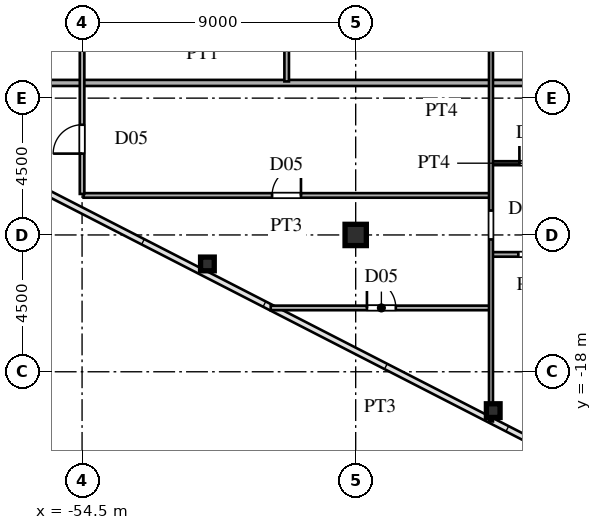
"""IFC4 building model, lengths in metres.
Left out: names, types, materials, properties, quantities, classifications, styles, units other than length and angle.
Written with IfcOpenShell. Run it as: python <this file> out.ifc"""

import sys

from ifc_helpers import new_model, si_unit, direction, frame, frame_2d, origin, origin_2d, place, context, subcontext, project, spatial, rectangle, hollow_rectangle, i_section, extrude, source, transform, mapped, element, fill, save


model = new_model("IFC4")
c1 = context("Model", 3, precision=1e-05, world=origin(), true_north=direction((0.0, 1.0)))
c2 = subcontext(c1, "Body", "Model", "MODEL_VIEW")
j1 = project(units=[si_unit("LENGTHUNIT", "METRE"), si_unit("PLANEANGLEUNIT", "RADIAN")], contexts=[c1])
p1 = place(None, origin())
s1 = spatial("IfcSite", under=j1, at=p1, CompositionType="ELEMENT")
p2 = place(p1, origin())
s2 = spatial("IfcBuilding", under=s1, at=p2, CompositionType="ELEMENT")
p3 = place(p2, frame((0.0, 0.0, 110.4)))
s3 = spatial("IfcBuildingStorey", under=s2, at=p3, CompositionType="ELEMENT", Elevation=110.4)
m1 = source(origin(), c2, "Body", "SweptSolid", [
    extrude(i_section(OverallWidth=0.7, OverallDepth=0.7, WebThickness=0.028, FlangeThickness=0.045, at=origin_2d()), origin(), (0.0, 0.0, 1.0), 3.6),
])
p4 = place(p3, frame((-45.5, -13.5, 0.0), z_axis=(0.0, 0.0, 1.0), x_axis=(1.0, 0.0, 0.0)))
e1 = element("IfcColumn", 1, at=p4, inside=s3, PredefinedType="COLUMN", context=c2, shape_type="MappedRepresentation", body=[
    mapped(m1, transform((0.0, 0.0, 0.0), scale=1.0)),
])
m2 = source(origin(), c2, "Body", "SweptSolid", [
    extrude(hollow_rectangle(XDim=0.45, YDim=0.45, WallThickness=0.018, at=origin_2d()), origin(), (0.0, 0.0, 1.0), 3.6),
])
for number, where, z_axis, x_axis in (
    (2, (-40.976, -19.278, 0.0), (0.0, 0.0, 1.0), (1.0, 0.0, 0.0)),
    (3, (-50.377, -14.453, 0.0), (0.0, 0.0, 1.0), (1.0, 0.0, 0.0)),
):
    element("IfcColumn", number, at=place(p3, frame(where, z_axis=z_axis, x_axis=x_axis)), inside=s3, PredefinedType="COLUMN", context=c2, shape_type="MappedRepresentation", body=[
        mapped(m2, transform((0.0, 0.0, 0.0), scale=1.0)),
    ])
p5 = place(p3, frame((-48.295, -15.9, 0.0), z_axis=(0.0, 0.0, 1.0), x_axis=(1.0, 0.0, 0.0)))
e4 = element("IfcWall", 4, at=p5, inside=s3, PredefinedType="PARTITIONING", context=c2, shape_type="SweptSolid", body=[
    extrude(rectangle(XDim=7.195, YDim=0.15, at=frame_2d((3.597, 0.0))), origin(), (0.0, 0.0, 1.0), 3.38),
])
p6 = place(p5, frame((3.165, 0.0, 0.0)))
e5 = element("IfcOpeningElement", 5, at=p6, cuts=e4, PredefinedType="OPENING", context=c2, shape_type="SweptSolid", body=[
    extrude(rectangle(XDim=0.95, YDim=2.15, at=frame_2d((0.475, 1.075))), frame((0.0, 0.085, 0.0), z_axis=(0.0, -1.0, 0.0), x_axis=(1.0, 0.0, 0.0)), (0.0, 0.0, 1.0), 0.17),
])
p7 = place(p3, frame((-41.0, -14.14, 0.0), z_axis=(0.0, 0.0, 1.0), x_axis=(1.0, 0.0, 0.0)))
e6 = element("IfcWall", 6, at=p7, inside=s3, PredefinedType="PARTITIONING", context=c2, shape_type="SweptSolid", body=[
    extrude(rectangle(XDim=2.65, YDim=0.15, at=frame_2d((1.325, 0.0))), origin(), (0.0, 0.0, 1.0), 3.38),
])
p8 = place(p7, frame((0.85, 0.0, 0.0)))
e7 = element("IfcOpeningElement", 7, at=p8, cuts=e6, PredefinedType="OPENING", context=c2, shape_type="SweptSolid", body=[
    extrude(rectangle(XDim=0.95, YDim=2.15, at=frame_2d((0.475, 1.075))), frame((0.0, 0.085, 0.0), z_axis=(0.0, -1.0, 0.0), x_axis=(1.0, 0.0, 0.0)), (0.0, 0.0, 1.0), 0.17),
])
p9 = place(p3, frame((-54.45, -12.2, 0.0), z_axis=(0.0, 0.0, 1.0), x_axis=(1.0, 0.0, 0.0)))
e8 = element("IfcWall", 8, at=p9, inside=s3, PredefinedType="PARTITIONING", context=c2, shape_type="SweptSolid", body=[
    extrude(rectangle(XDim=13.35, YDim=0.15, at=frame_2d((6.675, 0.0))), origin(), (0.0, 0.0, 1.0), 3.38),
])
p10 = place(p9, frame((6.2, 0.0, 0.0)))
e9 = element("IfcOpeningElement", 9, at=p10, cuts=e8, PredefinedType="OPENING", context=c2, shape_type="SweptSolid", body=[
    extrude(rectangle(XDim=0.95, YDim=2.15, at=frame_2d((0.475, 1.075))), frame((0.0, 0.085, 0.0), z_axis=(0.0, -1.0, 0.0), x_axis=(1.0, 0.0, 0.0)), (0.0, 0.0, 1.0), 0.17),
])
p11 = place(p3, frame((-41.0, -11.14, 0.0), z_axis=(0.0, 0.0, 1.0), x_axis=(1.0, 0.0, 0.0)))
e10 = element("IfcWall", 10, at=p11, inside=s3, PredefinedType="PARTITIONING", context=c2, shape_type="SweptSolid", body=[
    extrude(rectangle(XDim=2.65, YDim=0.13, at=frame_2d((1.325, 0.0))), origin(), (0.0, 0.0, 1.0), 3.38),
])
p12 = place(p11, frame((0.885, 0.0, 0.0)))
e11 = element("IfcOpeningElement", 11, at=p12, cuts=e10, PredefinedType="OPENING", context=c2, shape_type="SweptSolid", body=[
    extrude(rectangle(XDim=0.88, YDim=2.1, at=frame_2d((0.44, 1.05))), frame((0.0, 0.075, 0.0), z_axis=(0.0, -1.0, 0.0), x_axis=(1.0, 0.0, 0.0)), (0.0, 0.0, 1.0), 0.15),
])
p13 = place(p3, frame((-62.69, -8.5, 0.0), z_axis=(0.0, 0.0, 1.0), x_axis=(1.0, 0.0, 0.0)))
e12 = element("IfcWall", 12, at=p13, inside=s3, PredefinedType="PARTITIONING", context=c2, shape_type="SweptSolid", body=[
    extrude(rectangle(XDim=24.31, YDim=0.2, at=frame_2d((12.155, 0.0))), origin(), (0.0, 0.0, 1.0), 3.38),
])
p14 = place(p3, frame((-54.5, -12.15, 0.0), z_axis=(0.0, 0.0, 1.0), x_axis=(0.0, 1.0, 0.0)))
e13 = element("IfcWall", 13, at=p14, inside=s3, PredefinedType="PARTITIONING", context=c2, shape_type="SweptSolid", body=[
    extrude(rectangle(XDim=22.3, YDim=0.15, at=frame_2d((11.15, 0.0))), origin(), (0.0, 0.0, 1.0), 2.78),
])
p15 = place(p14, frame((1.325, 0.0, 0.0)))
e14 = element("IfcOpeningElement", 14, at=p15, cuts=e13, PredefinedType="OPENING", context=c2, shape_type="SweptSolid", body=[
    extrude(rectangle(XDim=0.95, YDim=2.15, at=frame_2d((0.475, 1.075))), frame((0.0, 0.085, 0.0), z_axis=(0.0, -1.0, 0.0), x_axis=(1.0, 0.0, 0.0)), (0.0, 0.0, 1.0), 0.17),
])
p16 = place(p14, frame((10.175, 0.0, 0.0)))
e15 = element("IfcOpeningElement", 15, at=p16, cuts=e13, PredefinedType="OPENING", context=c2, shape_type="SweptSolid", body=[
    extrude(rectangle(XDim=0.95, YDim=2.15, at=frame_2d((0.475, 1.075))), frame((0.0, 0.085, 0.0), z_axis=(0.0, -1.0, 0.0), x_axis=(1.0, 0.0, 0.0)), (0.0, 0.0, 1.0), 0.17),
])
p17 = place(p14, frame((5.508, 0.0, 0.0)))
e16 = element("IfcOpeningElement", 16, at=p17, cuts=e13, PredefinedType="OPENING", context=c2, shape_type="SweptSolid", body=[
    extrude(rectangle(XDim=0.95, YDim=2.15, at=frame_2d((0.475, 1.075))), frame((0.0, 0.085, 0.0), z_axis=(0.0, -1.0, 0.0), x_axis=(1.0, 0.0, 0.0)), (0.0, 0.0, 1.0), 0.17),
])
p18 = place(p14, frame((14.842, 0.0, 0.0)))
e17 = element("IfcOpeningElement", 17, at=p18, cuts=e13, PredefinedType="OPENING", context=c2, shape_type="SweptSolid", body=[
    extrude(rectangle(XDim=0.95, YDim=2.15, at=frame_2d((0.475, 1.075))), frame((0.0, 0.085, 0.0), z_axis=(0.0, -1.0, 0.0), x_axis=(1.0, 0.0, 0.0)), (0.0, 0.0, 1.0), 0.17),
])
p19 = place(p14, frame((19.525, 0.0, 0.0)))
e18 = element("IfcOpeningElement", 18, at=p19, cuts=e13, PredefinedType="OPENING", context=c2, shape_type="SweptSolid", body=[
    extrude(rectangle(XDim=0.95, YDim=2.15, at=frame_2d((0.475, 1.075))), frame((0.0, 0.085, 0.0), z_axis=(0.0, -1.0, 0.0), x_axis=(1.0, 0.0, 0.0)), (0.0, 0.0, 1.0), 0.17),
])
p20 = place(p3, frame((-47.77, -8.45, 0.0), z_axis=(0.0, 0.0, 1.0), x_axis=(0.0, 1.0, 0.0)))
e19 = element("IfcWall", 19, at=p20, inside=s3, PredefinedType="PARTITIONING", context=c2, shape_type="SweptSolid", body=[
    extrude(rectangle(XDim=23.3, YDim=0.15, at=frame_2d((11.65, 0.0))), origin(), (0.0, 0.0, 1.0), 3.38),
])
p21 = place(p20, frame((6.475, 0.0, 0.0)))
e20 = element("IfcOpeningElement", 20, at=p21, cuts=e19, PredefinedType="OPENING", context=c2, shape_type="SweptSolid", body=[
    extrude(rectangle(XDim=0.95, YDim=2.15, at=frame_2d((0.475, 1.075))), frame((0.0, 0.085, 0.0), z_axis=(0.0, -1.0, 0.0), x_axis=(1.0, 0.0, 0.0)), (0.0, 0.0, 1.0), 0.17),
])
p22 = place(p20, frame((20.525, 0.0, 0.0)))
e21 = element("IfcOpeningElement", 21, at=p22, cuts=e19, PredefinedType="OPENING", context=c2, shape_type="SweptSolid", body=[
    extrude(rectangle(XDim=0.95, YDim=2.15, at=frame_2d((0.475, 1.075))), frame((0.0, 0.085, 0.0), z_axis=(0.0, -1.0, 0.0), x_axis=(1.0, 0.0, 0.0)), (0.0, 0.0, 1.0), 0.17),
])
p23 = place(p20, frame((15.825, 0.0, 0.0)))
e22 = element("IfcOpeningElement", 22, at=p23, cuts=e19, PredefinedType="OPENING", context=c2, shape_type="SweptSolid", body=[
    extrude(rectangle(XDim=0.95, YDim=2.15, at=frame_2d((0.475, 1.075))), frame((0.0, 0.085, 0.0), z_axis=(0.0, -1.0, 0.0), x_axis=(1.0, 0.0, 0.0)), (0.0, 0.0, 1.0), 0.17),
])
p24 = place(p3, frame((-41.05, -19.634, 0.0), z_axis=(0.0, 0.0, 1.0), x_axis=(0.0, 1.0, 0.0)))
e23 = element("IfcWall", 23, at=p24, inside=s3, PredefinedType="PARTITIONING", context=c2, shape_type="SweptSolid", body=[
    extrude(rectangle(XDim=20.417, YDim=0.13, at=frame_2d((10.208, 0.0))), origin(), (0.0, 0.0, 1.0), 2.99),
])
p25 = place(p24, frame((5.987, 0.0, 0.0)))
e24 = element("IfcOpeningElement", 24, at=p25, cuts=e23, PredefinedType="OPENING", context=c2, shape_type="SweptSolid", body=[
    extrude(rectangle(XDim=0.95, YDim=2.15, at=frame_2d((0.475, 1.075))), frame((0.0, 0.075, 0.0), z_axis=(0.0, -1.0, 0.0), x_axis=(1.0, 0.0, 0.0)), (0.0, 0.0, 1.0), 0.15),
])
p26 = place(p24, frame((17.659, 0.0, 0.0)))
e25 = element("IfcOpeningElement", 25, at=p26, cuts=e23, PredefinedType="OPENING", context=c2, shape_type="SweptSolid", body=[
    extrude(rectangle(XDim=0.95, YDim=2.15, at=frame_2d((0.475, 1.075))), frame((0.0, 0.075, 0.0), z_axis=(0.0, -1.0, 0.0), x_axis=(1.0, 0.0, 0.0)), (0.0, 0.0, 1.0), 0.15),
])
m3 = source(origin(), c2, "Body", "SweptSolid", [
    extrude(rectangle(XDim=0.95, YDim=2.15, at=frame_2d((0.475, 1.075))), frame((0.0, 0.025, 0.0), z_axis=(0.0, -1.0, 0.0), x_axis=(1.0, 0.0, 0.0)), (0.0, 0.0, 1.0), 0.05),
])
p27 = place(p6, origin())
e26 = element("IfcDoor", 26, at=p27, inside=s3, OperationType="SINGLE_SWING_LEFT", PredefinedType="DOOR", context=c2, shape_type="MappedRepresentation", body=[
    mapped(m3, transform((0.0, 0.0, 0.0), scale=1.0)),
])
fill(e5, e26)
p28 = place(p10, origin())
e27 = element("IfcDoor", 27, at=p28, inside=s3, OperationType="SINGLE_SWING_RIGHT", PredefinedType="DOOR", context=c2, shape_type="MappedRepresentation", body=[
    mapped(m3, transform((0.0, 0.0, 0.0), scale=1.0)),
])
fill(e9, e27)
m4 = source(origin(), c2, "Body", "SweptSolid", [
    extrude(rectangle(XDim=0.88, YDim=2.1, at=frame_2d((0.44, 1.05))), frame((0.0, 0.025, 0.0), z_axis=(0.0, -1.0, 0.0), x_axis=(1.0, 0.0, 0.0)), (0.0, 0.0, 1.0), 0.05),
])
p29 = place(p12, origin())
e28 = element("IfcDoor", 28, at=p29, inside=s3, OperationType="SINGLE_SWING_LEFT", PredefinedType="DOOR", context=c2, shape_type="MappedRepresentation", body=[
    mapped(m4, transform((0.0, 0.0, 0.0), scale=1.0)),
])
fill(e11, e28)
p30 = place(p15, origin())
e29 = element("IfcDoor", 29, at=p30, inside=s3, OperationType="SINGLE_SWING_LEFT", PredefinedType="DOOR", context=c2, shape_type="MappedRepresentation", body=[
    mapped(m3, transform((0.0, 0.0, 0.0), scale=1.0)),
])
fill(e14, e29)
save(model, sys.argv[1])
